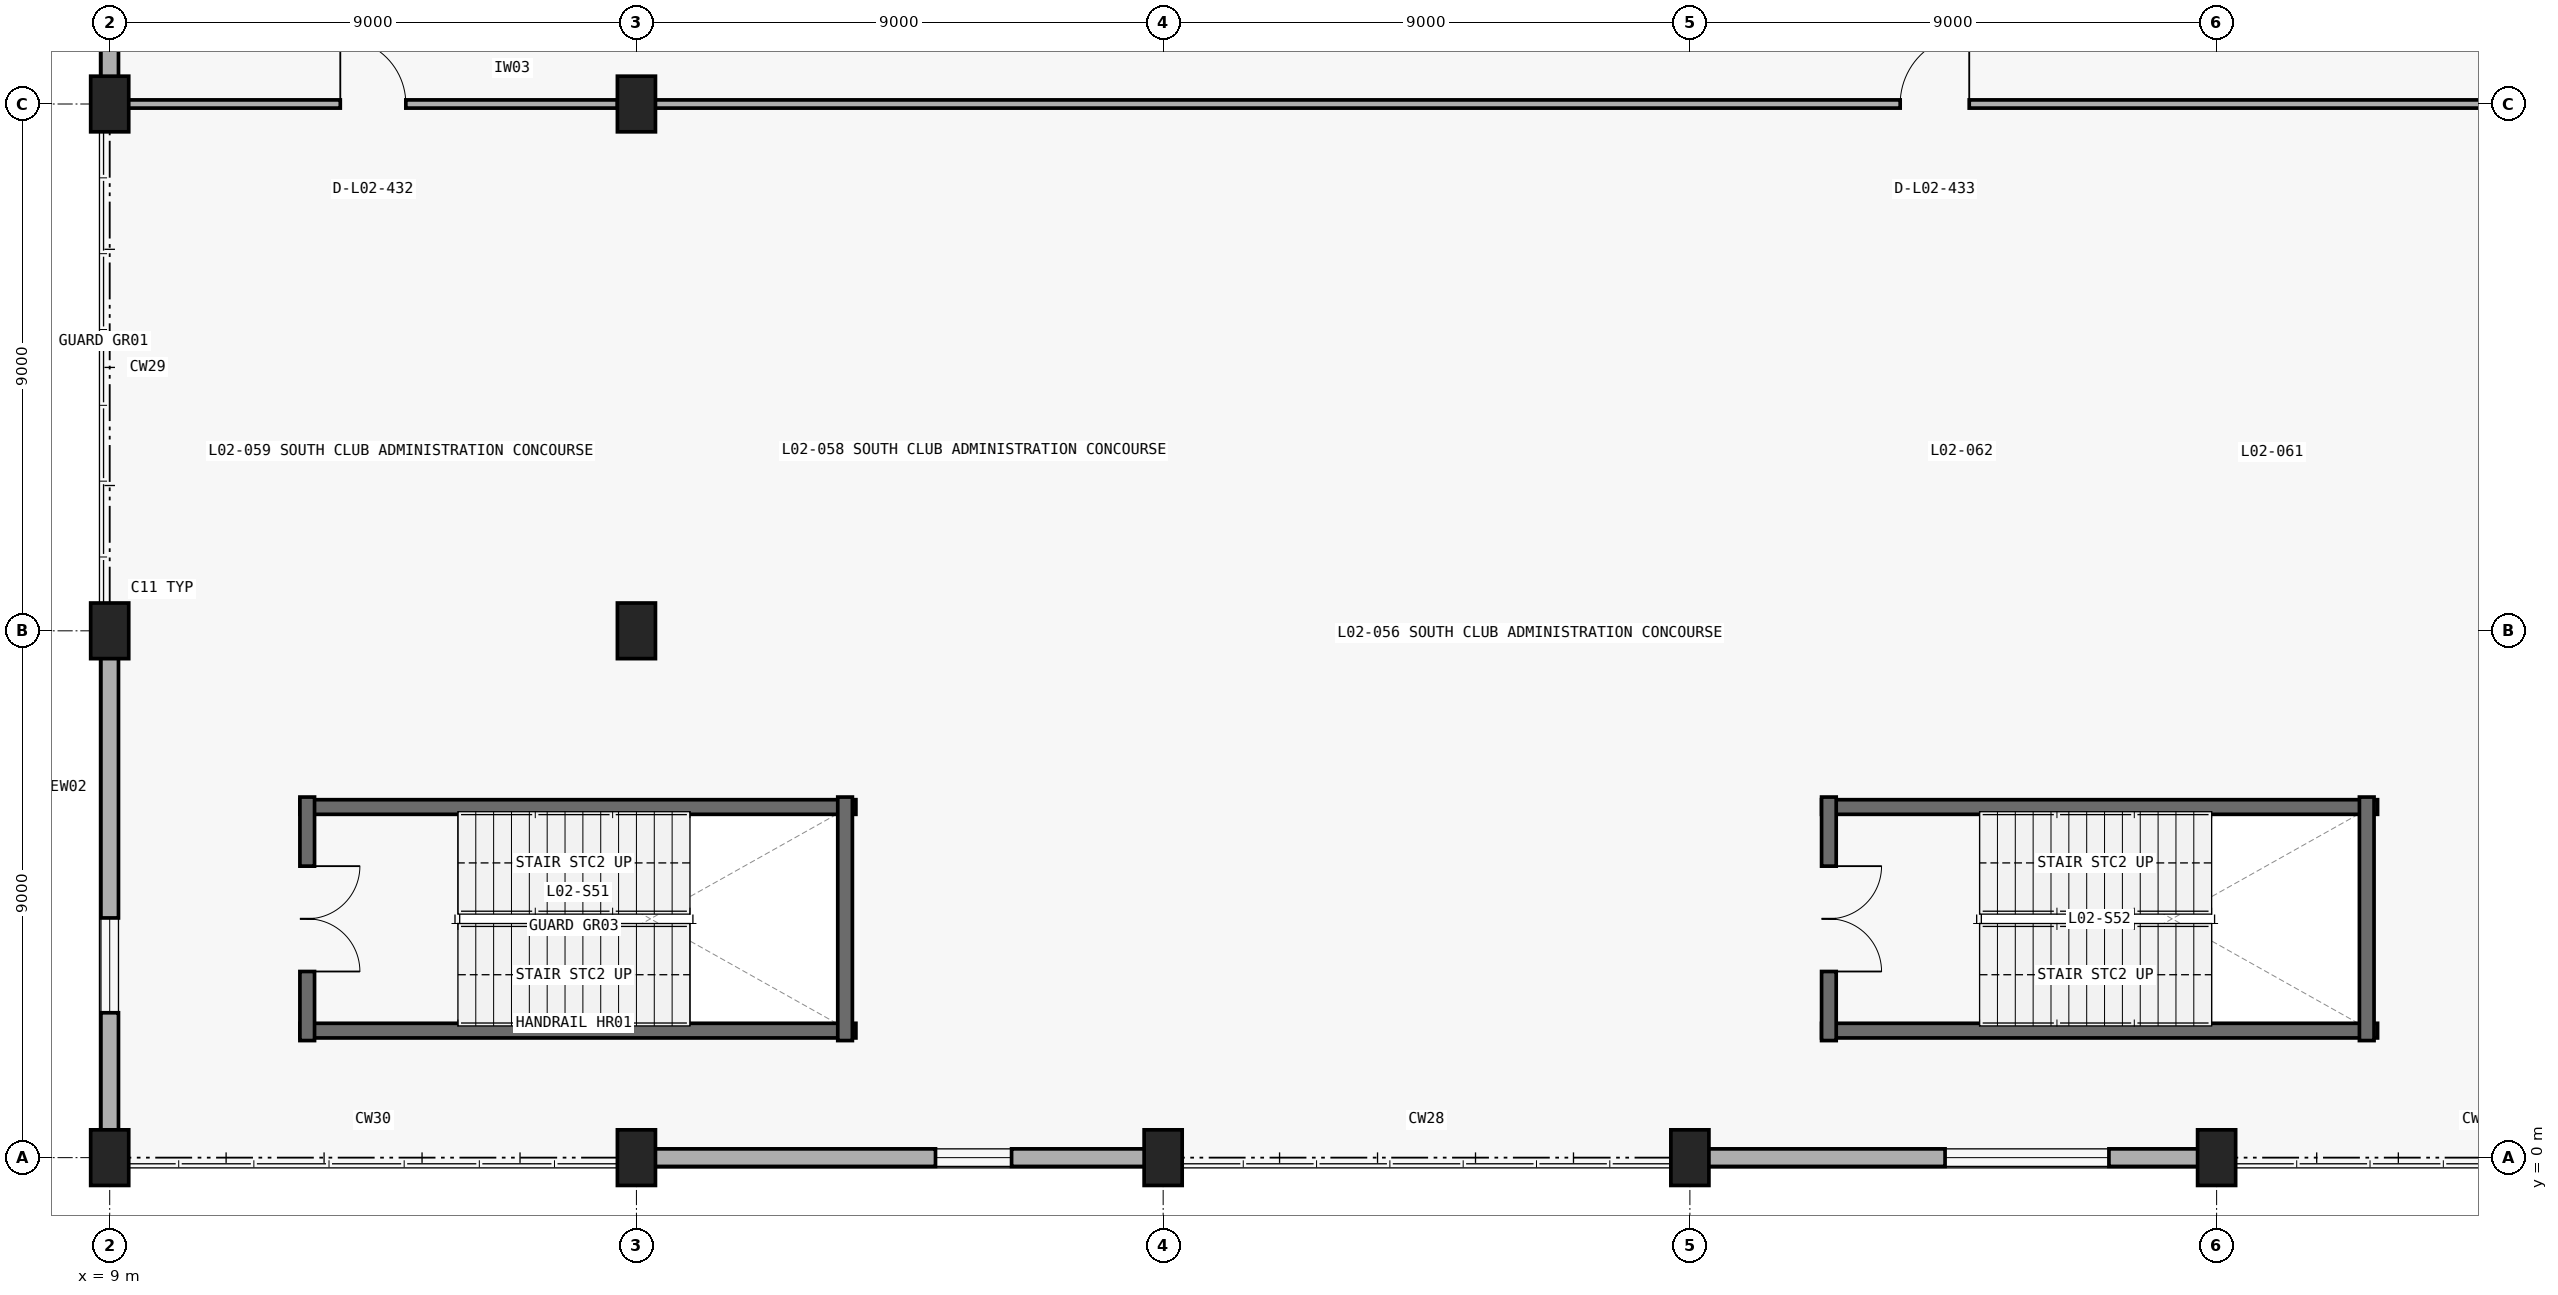
"""IFC4 building model, lengths in metres.
Left out: names, types, materials, properties, quantities, classifications, styles, units other than length and angle.
Written with IfcOpenShell. Run it as: python <this file> out.ifc"""

import sys

from ifc_helpers import new_model, si_unit, direction, frame, frame_2d, origin, origin_2d, place, context, subcontext, project, spatial, rectangle, extrude, element, fill, save


model = new_model("IFC4")
c1 = context("Model", 3, precision=1e-05, world=origin(), true_north=direction((0.0, 1.0)))
c2 = subcontext(c1, "Body", "Model", "MODEL_VIEW")
j1 = project(units=[si_unit("LENGTHUNIT", "METRE"), si_unit("PLANEANGLEUNIT", "RADIAN")], contexts=[c1])
p1 = place(None, origin())
s1 = spatial("IfcSite", under=j1, at=p1, CompositionType="ELEMENT")
p2 = place(p1, origin())
s2 = spatial("IfcBuilding", under=s1, at=p2, CompositionType="ELEMENT")
p3 = place(p2, frame((0.0, 0.0, 10.2)))
s3 = spatial("IfcBuildingStorey", under=s2, at=p3, CompositionType="ELEMENT", Elevation=10.2)
for number, where, z_axis, x_axis in (
    (1, (9.0, 0.0, 0.0), (0.0, 0.0, 1.0), (1.0, 0.0, 0.0)),
    (2, (9.0, 9.0, 0.0), (0.0, 0.0, 1.0), (1.0, 0.0, 0.0)),
    (3, (9.0, 18.0, 0.0), (0.0, 0.0, 1.0), (1.0, 0.0, 0.0)),
    (4, (18.0, 0.0, 0.0), (0.0, 0.0, 1.0), (1.0, 0.0, 0.0)),
    (5, (18.0, 9.0, 0.0), (0.0, 0.0, 1.0), (1.0, 0.0, 0.0)),
    (6, (18.0, 18.0, 0.0), (0.0, 0.0, 1.0), (1.0, 0.0, 0.0)),
    (7, (27.0, 0.0, 0.0), (0.0, 0.0, 1.0), (1.0, 0.0, 0.0)),
    (8, (36.0, 0.0, 0.0), (0.0, 0.0, 1.0), (1.0, 0.0, 0.0)),
    (9, (45.0, 0.0, 0.0), (0.0, 0.0, 1.0), (1.0, 0.0, 0.0)),
):
    element("IfcColumn", number, at=place(p3, frame(where, z_axis=z_axis, x_axis=x_axis)), inside=s3, PredefinedType="COLUMN", context=c2, shape_type="SweptSolid", body=[
        extrude(rectangle(XDim=0.65, YDim=0.95, at=origin_2d()), origin(), (0.0, 0.0, 1.0), 4.8),
    ])
p4 = place(p3, frame((44.7, 0.0, 0.0), z_axis=(0.0, 0.0, 1.0), x_axis=(-1.0, 0.0, 0.0)))
e10 = element("IfcWall", 10, at=p4, inside=s3, PredefinedType="STANDARD", context=c2, shape_type="SweptSolid", body=[
    extrude(rectangle(XDim=8.4, YDim=0.3, at=frame_2d((4.2, 0.0))), origin(), (0.0, 0.0, 1.0), 3.855),
])
p5 = place(p4, frame((1.54, 0.0, 0.95)))
e11 = element("IfcOpeningElement", 11, at=p5, cuts=e10, PredefinedType="OPENING", context=c2, shape_type="SweptSolid", body=[
    extrude(rectangle(XDim=2.8, YDim=2.4, at=frame_2d((1.4, 1.2))), frame((0.0, 0.16, 0.0), z_axis=(0.0, -1.0, 0.0), x_axis=(1.0, 0.0, 0.0)), (0.0, 0.0, 1.0), 0.32),
])
p6 = place(p3, frame((26.7, 0.0, 0.0), z_axis=(0.0, 0.0, 1.0), x_axis=(-1.0, 0.0, 0.0)))
e12 = element("IfcWall", 12, at=p6, inside=s3, PredefinedType="STANDARD", context=c2, shape_type="SweptSolid", body=[
    extrude(rectangle(XDim=8.4, YDim=0.3, at=frame_2d((4.2, 0.0))), origin(), (0.0, 0.0, 1.0), 3.855),
])
p7 = place(p6, frame((2.29, 0.0, 0.95)))
e13 = element("IfcOpeningElement", 13, at=p7, cuts=e12, PredefinedType="OPENING", context=c2, shape_type="SweptSolid", body=[
    extrude(rectangle(XDim=1.3, YDim=1.75, at=frame_2d((0.65, 0.875))), frame((0.0, 0.16, 0.0), z_axis=(0.0, -1.0, 0.0), x_axis=(1.0, 0.0, 0.0)), (0.0, 0.0, 1.0), 0.32),
])
p8 = place(p3, frame((9.0, 0.45, 0.0), z_axis=(0.0, 0.0, 1.0), x_axis=(0.0, 1.0, 0.0)))
e14 = element("IfcWall", 14, at=p8, inside=s3, PredefinedType="STANDARD", context=c2, shape_type="SweptSolid", body=[
    extrude(rectangle(XDim=8.1, YDim=0.3, at=frame_2d((4.05, 0.0))), origin(), (0.0, 0.0, 1.0), 3.817),
])
p9 = place(p8, frame((2.025, 0.0, 0.95)))
e15 = element("IfcOpeningElement", 15, at=p9, cuts=e14, PredefinedType="OPENING", context=c2, shape_type="SweptSolid", body=[
    extrude(rectangle(XDim=1.62, YDim=2.12, at=frame_2d((0.81, 1.06))), frame((0.0, 0.16, 0.0), z_axis=(0.0, -1.0, 0.0), x_axis=(1.0, 0.0, 0.0)), (0.0, 0.0, 1.0), 0.32),
])
p10 = place(p3, frame((9.0, 18.45, 0.0), z_axis=(0.0, 0.0, 1.0), x_axis=(0.0, 1.0, 0.0)))
e16 = element("IfcWall", 16, at=p10, inside=s3, PredefinedType="STANDARD", context=c2, shape_type="SweptSolid", body=[
    extrude(rectangle(XDim=8.1, YDim=0.3, at=frame_2d((4.05, 0.0))), origin(), (0.0, 0.0, 1.0), 3.817),
])
p11 = place(p10, frame((1.875, 0.0, 0.95)))
e17 = element("IfcOpeningElement", 17, at=p11, cuts=e16, PredefinedType="OPENING", context=c2, shape_type="SweptSolid", body=[
    extrude(rectangle(XDim=1.92, YDim=2.18, at=frame_2d((0.96, 1.09))), frame((0.0, 0.16, 0.0), z_axis=(0.0, -1.0, 0.0), x_axis=(1.0, 0.0, 0.0)), (0.0, 0.0, 1.0), 0.32),
])
for number, where, z_axis, x_axis in (
    (18, (12.25, 2.17, 0.0), (0.0, 0.0, 1.0), (1.0, 0.0, 0.0)),
    (19, (21.75, 5.99, 0.0), (0.0, 0.0, 1.0), (-1.0, 0.0, 0.0)),
):
    element("IfcWall", number, at=place(p3, frame(where, z_axis=z_axis, x_axis=x_axis)), inside=s3, PredefinedType="SHEAR", context=c2, shape_type="SweptSolid", body=[
        extrude(rectangle(XDim=9.5, YDim=0.25, at=frame_2d((4.75, 0.0))), origin(), (0.0, 0.0, 1.0), 4.5),
    ])
p12 = place(p3, frame((12.375, 6.16, 0.0), z_axis=(0.0, 0.0, 1.0), x_axis=(0.0, -1.0, 0.0)))
e20 = element("IfcWall", 20, at=p12, inside=s3, PredefinedType="SHEAR", context=c2, shape_type="SweptSolid", body=[
    extrude(rectangle(XDim=4.16, YDim=0.25, at=frame_2d((2.08, 0.0))), origin(), (0.0, 0.0, 1.0), 4.5),
])
p13 = place(p12, frame((1.18, 0.0, 0.0)))
e21 = element("IfcOpeningElement", 21, at=p13, cuts=e20, PredefinedType="OPENING", context=c2, shape_type="SweptSolid", body=[
    extrude(rectangle(XDim=1.8, YDim=2.25, at=frame_2d((0.9, 1.125))), frame((0.0, 0.135, 0.0), z_axis=(0.0, -1.0, 0.0), x_axis=(1.0, 0.0, 0.0)), (0.0, 0.0, 1.0), 0.27),
])
p14 = place(p3, frame((21.565, 2.0, 0.0), z_axis=(0.0, 0.0, 1.0), x_axis=(0.0, 1.0, 0.0)))
e22 = element("IfcWall", 22, at=p14, inside=s3, PredefinedType="SHEAR", context=c2, shape_type="SweptSolid", body=[
    extrude(rectangle(XDim=4.16, YDim=0.25, at=frame_2d((2.08, 0.0))), origin(), (0.0, 0.0, 1.0), 4.5),
])
for number, where, z_axis, x_axis in (
    (23, (38.25, 2.17, 0.0), (0.0, 0.0, 1.0), (1.0, 0.0, 0.0)),
    (24, (47.75, 5.99, 0.0), (0.0, 0.0, 1.0), (-1.0, 0.0, 0.0)),
):
    element("IfcWall", number, at=place(p3, frame(where, z_axis=z_axis, x_axis=x_axis)), inside=s3, PredefinedType="SHEAR", context=c2, shape_type="SweptSolid", body=[
        extrude(rectangle(XDim=9.5, YDim=0.25, at=frame_2d((4.75, 0.0))), origin(), (0.0, 0.0, 1.0), 4.5),
    ])
p15 = place(p3, frame((38.375, 6.16, 0.0), z_axis=(0.0, 0.0, 1.0), x_axis=(0.0, -1.0, 0.0)))
e25 = element("IfcWall", 25, at=p15, inside=s3, PredefinedType="SHEAR", context=c2, shape_type="SweptSolid", body=[
    extrude(rectangle(XDim=4.16, YDim=0.25, at=frame_2d((2.08, 0.0))), origin(), (0.0, 0.0, 1.0), 4.5),
])
p16 = place(p15, frame((1.18, 0.0, 0.0)))
e26 = element("IfcOpeningElement", 26, at=p16, cuts=e25, PredefinedType="OPENING", context=c2, shape_type="SweptSolid", body=[
    extrude(rectangle(XDim=1.8, YDim=2.25, at=frame_2d((0.9, 1.125))), frame((0.0, 0.135, 0.0), z_axis=(0.0, -1.0, 0.0), x_axis=(1.0, 0.0, 0.0)), (0.0, 0.0, 1.0), 0.27),
])
p17 = place(p3, frame((47.565, 2.0, 0.0), z_axis=(0.0, 0.0, 1.0), x_axis=(0.0, 1.0, 0.0)))
e27 = element("IfcWall", 27, at=p17, inside=s3, PredefinedType="SHEAR", context=c2, shape_type="SweptSolid", body=[
    extrude(rectangle(XDim=4.16, YDim=0.25, at=frame_2d((2.08, 0.0))), origin(), (0.0, 0.0, 1.0), 4.5),
])
p18 = place(p3, frame((9.31, 18.0, 0.0), z_axis=(0.0, 0.0, 1.0), x_axis=(1.0, 0.0, 0.0)))
e28 = element("IfcWall", 28, at=p18, inside=s3, PredefinedType="PARTITIONING", context=c2, shape_type="SweptSolid", body=[
    extrude(rectangle(XDim=8.38, YDim=0.14, at=frame_2d((4.19, 0.0))), origin(), (0.0, 0.0, 1.0), 3.855),
])
p19 = place(p18, frame((3.63, 0.0, 0.0)))
e29 = element("IfcOpeningElement", 29, at=p19, cuts=e28, PredefinedType="OPENING", context=c2, shape_type="SweptSolid", body=[
    extrude(rectangle(XDim=1.12, YDim=2.25, at=frame_2d((0.56, 1.125))), frame((0.0, 0.08, 0.0), z_axis=(0.0, -1.0, 0.0), x_axis=(1.0, 0.0, 0.0)), (0.0, 0.0, 1.0), 0.16),
])
p20 = place(p3, frame((17.675, 18.0, 0.0), z_axis=(0.0, 0.0, 1.0), x_axis=(1.0, 0.0, 0.0)))
e30 = element("IfcWall", 30, at=p20, inside=s3, PredefinedType="PARTITIONING", context=c2, shape_type="SweptSolid", body=[
    extrude(rectangle(XDim=45.015, YDim=0.14, at=frame_2d((22.507, 0.0))), origin(), (0.0, 0.0, 1.0), 3.855),
])
p21 = place(p20, frame((21.918, 0.0, 0.0)))
e31 = element("IfcOpeningElement", 31, at=p21, cuts=e30, PredefinedType="OPENING", context=c2, shape_type="SweptSolid", body=[
    extrude(rectangle(XDim=1.18, YDim=2.25, at=frame_2d((0.59, 1.125))), frame((0.0, 0.08, 0.0), z_axis=(0.0, -1.0, 0.0), x_axis=(1.0, 0.0, 0.0)), (0.0, 0.0, 1.0), 0.16),
])
p22 = place(p5, origin())
e32 = element("IfcWindow", 32, at=p22, inside=s3, PartitioningType="SINGLE_PANEL", PredefinedType="WINDOW", context=c2, shape_type="SweptSolid", body=[
    extrude(rectangle(XDim=2.8, YDim=2.4, at=frame_2d((1.4, 1.2))), frame((0.0, 0.03, 0.0), z_axis=(0.0, -1.0, 0.0), x_axis=(1.0, 0.0, 0.0)), (0.0, 0.0, 1.0), 0.06),
])
fill(e11, e32)
p23 = place(p7, origin())
e33 = element("IfcWindow", 33, at=p23, inside=s3, PartitioningType="SINGLE_PANEL", PredefinedType="WINDOW", context=c2, shape_type="SweptSolid", body=[
    extrude(rectangle(XDim=1.3, YDim=1.75, at=frame_2d((0.65, 0.875))), frame((0.0, 0.03, 0.0), z_axis=(0.0, -1.0, 0.0), x_axis=(1.0, 0.0, 0.0)), (0.0, 0.0, 1.0), 0.06),
])
fill(e13, e33)
p24 = place(p9, origin())
e34 = element("IfcWindow", 34, at=p24, inside=s3, PartitioningType="SINGLE_PANEL", PredefinedType="WINDOW", context=c2, shape_type="SweptSolid", body=[
    extrude(rectangle(XDim=1.62, YDim=2.12, at=frame_2d((0.81, 1.06))), frame((0.0, 0.03, 0.0), z_axis=(0.0, -1.0, 0.0), x_axis=(1.0, 0.0, 0.0)), (0.0, 0.0, 1.0), 0.06),
])
fill(e15, e34)
p25 = place(p13, origin())
e35 = element("IfcDoor", 35, at=p25, inside=s3, OperationType="DOUBLE_DOOR_SINGLE_SWING", PredefinedType="DOOR", context=c2, shape_type="SweptSolid", body=[
    extrude(rectangle(XDim=1.8, YDim=2.25, at=frame_2d((0.9, 1.125))), frame((0.0, 0.025, 0.0), z_axis=(0.0, -1.0, 0.0), x_axis=(1.0, 0.0, 0.0)), (0.0, 0.0, 1.0), 0.05),
])
fill(e21, e35)
p26 = place(p16, origin())
e36 = element("IfcDoor", 36, at=p26, inside=s3, OperationType="DOUBLE_DOOR_SINGLE_SWING", PredefinedType="DOOR", context=c2, shape_type="SweptSolid", body=[
    extrude(rectangle(XDim=1.8, YDim=2.25, at=frame_2d((0.9, 1.125))), frame((0.0, 0.025, 0.0), z_axis=(0.0, -1.0, 0.0), x_axis=(1.0, 0.0, 0.0)), (0.0, 0.0, 1.0), 0.05),
])
fill(e26, e36)
p27 = place(p19, origin())
e37 = element("IfcDoor", 37, at=p27, inside=s3, OperationType="SINGLE_SWING_LEFT", PredefinedType="DOOR", context=c2, shape_type="SweptSolid", body=[
    extrude(rectangle(XDim=1.12, YDim=2.25, at=frame_2d((0.56, 1.125))), frame((0.0, 0.025, 0.0), z_axis=(0.0, -1.0, 0.0), x_axis=(1.0, 0.0, 0.0)), (0.0, 0.0, 1.0), 0.05),
])
fill(e29, e37)
p28 = place(p21, origin())
e38 = element("IfcDoor", 38, at=p28, inside=s3, OperationType="SINGLE_SWING_RIGHT", PredefinedType="DOOR", context=c2, shape_type="SweptSolid", body=[
    extrude(rectangle(XDim=1.18, YDim=2.25, at=frame_2d((0.59, 1.125))), frame((0.0, 0.025, 0.0), z_axis=(0.0, -1.0, 0.0), x_axis=(1.0, 0.0, 0.0)), (0.0, 0.0, 1.0), 0.05),
])
fill(e31, e38)
save(model, sys.argv[1])
